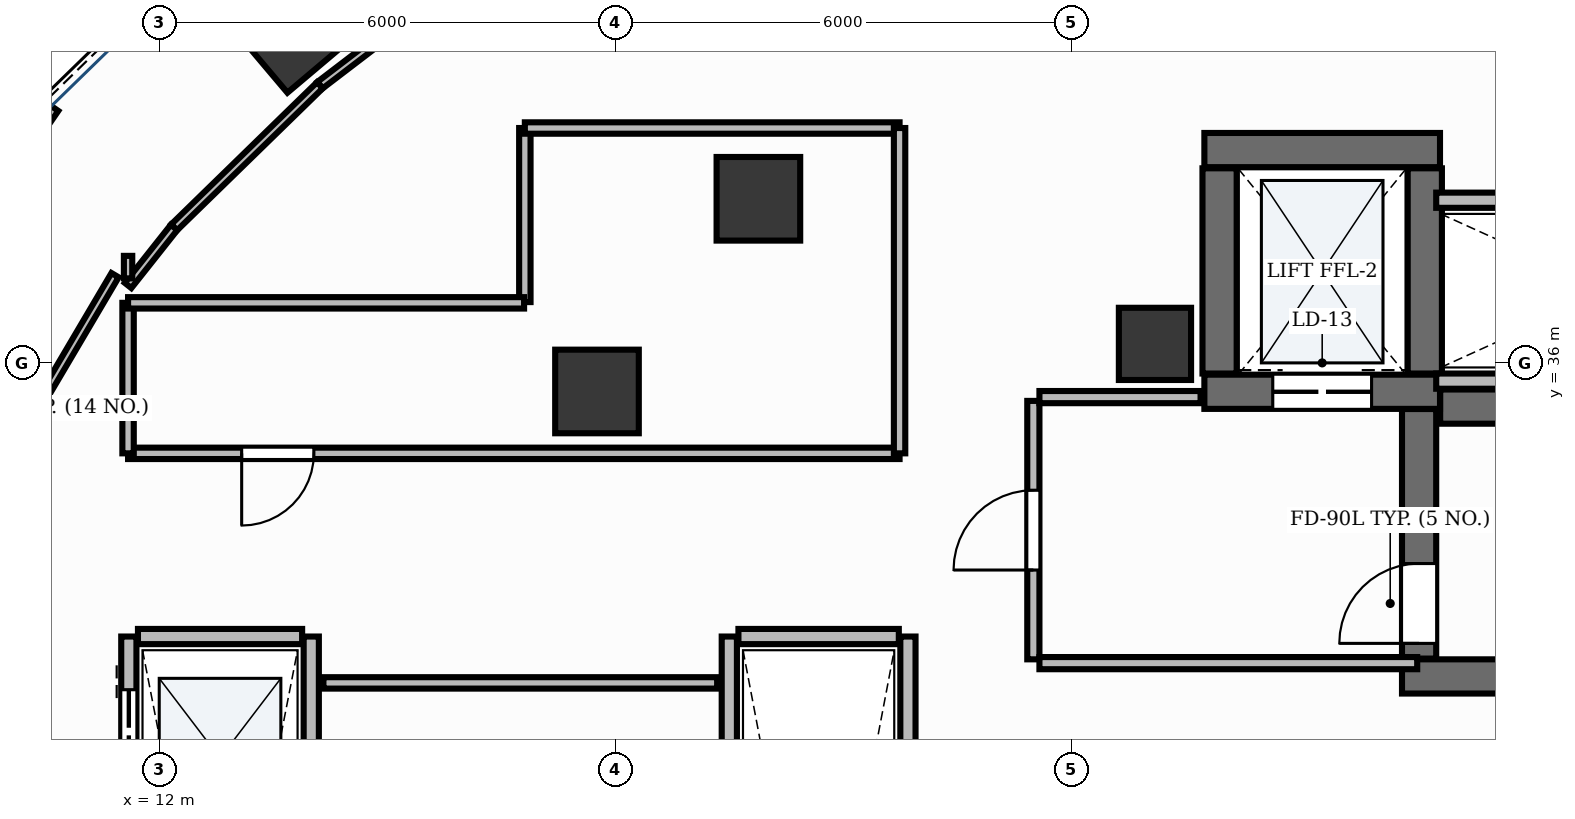
"""IFC4 building model, lengths in metres.
Left out: names, types, materials, properties, quantities, classifications, styles, units other than length and angle.
Written with IfcOpenShell. Run it as: python <this file> out.ifc"""

import sys

from ifc_helpers import new_model, si_unit, direction, frame, frame_2d, origin, origin_2d, place, context, subcontext, project, spatial, rectangle, extrude, element, fill, save


model = new_model("IFC4")
c1 = context("Model", 3, precision=1e-05, world=origin(), true_north=direction((0.0, 1.0)))
c2 = subcontext(c1, "Body", "Model", "MODEL_VIEW")
j1 = project(units=[si_unit("LENGTHUNIT", "METRE"), si_unit("PLANEANGLEUNIT", "RADIAN")], contexts=[c1])
p1 = place(None, origin())
s1 = spatial("IfcSite", under=j1, at=p1, CompositionType="ELEMENT")
p2 = place(p1, origin())
s2 = spatial("IfcBuilding", under=s1, at=p2, CompositionType="ELEMENT")
p3 = place(p2, frame((0.0, 0.0, 106.8)))
s3 = spatial("IfcBuildingStorey", under=s2, at=p3, CompositionType="ELEMENT", Elevation=106.8)
p4 = place(p3, frame((28.852, 35.425, 0.0), z_axis=(0.0, 0.0, 1.0), x_axis=(1.0, 0.0, 0.0)))
e1 = element("IfcWall", 1, at=p4, inside=s3, PredefinedType="SHEAR", context=c2, shape_type="SweptSolid", body=[
    extrude(rectangle(XDim=8.248, YDim=0.45, at=frame_2d((4.124, 0.0))), origin(), (0.0, 0.0, 1.0), 3.9),
])
p5 = place(p3, frame((28.35, 31.875, 0.0), z_axis=(0.0, 0.0, 1.0), x_axis=(1.0, 0.0, 0.0)))
e2 = element("IfcWall", 2, at=p5, inside=s3, PredefinedType="SHEAR", context=c2, shape_type="SweptSolid", body=[
    extrude(rectangle(XDim=8.75, YDim=0.45, at=frame_2d((4.375, 0.0))), origin(), (0.0, 0.0, 1.0), 3.9),
])
p6 = place(p3, frame((28.575, 32.11, 0.0), z_axis=(0.0, 0.0, 1.0), x_axis=(0.0, 1.0, 0.0)))
e3 = element("IfcWall", 3, at=p6, inside=s3, PredefinedType="SHEAR", context=c2, shape_type="SweptSolid", body=[
    extrude(rectangle(XDim=3.283, YDim=0.45, at=frame_2d((1.642, 0.0))), origin(), (0.0, 0.0, 1.0), 3.9),
])
p7 = place(p6, frame((0.2, 0.0, 0.0)))
e4 = element("IfcOpeningElement", 4, at=p7, cuts=e3, PredefinedType="OPENING", context=c2, shape_type="SweptSolid", body=[
    extrude(rectangle(XDim=1.05, YDim=2.15, at=frame_2d((0.525, 1.075))), frame((0.0, 0.24, 0.0), z_axis=(0.0, -1.0, 0.0), x_axis=(1.0, 0.0, 0.0)), (0.0, 0.0, 1.0), 0.48),
])
p8 = place(p3, frame((25.75, 38.8, 0.0), z_axis=(0.0, 0.0, 1.0), x_axis=(1.0, 0.0, 0.0)))
e5 = element("IfcWall", 5, at=p8, inside=s3, PredefinedType="SHEAR", context=c2, shape_type="SweptSolid", body=[
    extrude(rectangle(XDim=3.1, YDim=0.45, at=frame_2d((1.55, 0.0))), origin(), (0.0, 0.0, 1.0), 3.9),
])
p9 = place(p3, frame((25.75, 35.62, 0.0), z_axis=(0.0, 0.0, 1.0), x_axis=(1.0, 0.0, 0.0)))
e6 = element("IfcWall", 6, at=p9, inside=s3, PredefinedType="SHEAR", context=c2, shape_type="SweptSolid", body=[
    extrude(rectangle(XDim=3.1, YDim=0.45, at=frame_2d((1.55, 0.0))), origin(), (0.0, 0.0, 1.0), 3.9),
])
p10 = place(p9, frame((0.9, 0.0, 0.0)))
e7 = element("IfcOpeningElement", 7, at=p10, cuts=e6, PredefinedType="OPENING", context=c2, shape_type="SweptSolid", body=[
    extrude(rectangle(XDim=1.3, YDim=2.2, at=frame_2d((0.65, 1.1))), frame((0.0, 0.24, 0.0), z_axis=(0.0, -1.0, 0.0), x_axis=(1.0, 0.0, 0.0)), (0.0, 0.0, 1.0), 0.48),
])
for number, where, z_axis, x_axis in (
    (8, (25.95, 35.86, 0.0), (0.0, 0.0, 1.0), (0.0, 1.0, 0.0)),
    (9, (28.65, 35.86, 0.0), (0.0, 0.0, 1.0), (0.0, 1.0, 0.0)),
):
    element("IfcWall", number, at=place(p3, frame(where, z_axis=z_axis, x_axis=x_axis)), inside=s3, PredefinedType="SHEAR", context=c2, shape_type="SweptSolid", body=[
        extrude(rectangle(XDim=2.7, YDim=0.45, at=frame_2d((1.35, 0.0))), origin(), (0.0, 0.0, 1.0), 3.9),
    ])
p11 = place(p3, frame((25.1, 36.25, -0.0), z_axis=(0.0, 0.0, 1.0), x_axis=(1.0, 0.0, 0.0)))
e10 = element("IfcColumn", 10, at=p11, inside=s3, PredefinedType="PILASTER", context=c2, shape_type="SweptSolid", body=[
    extrude(rectangle(XDim=0.95, YDim=0.95, at=origin_2d()), origin(), (0.0, 0.0, 1.0), 3.901),
])
p12 = place(p3, frame((13.758, 40.4, -0.0), z_axis=(0.0, 0.0, 1.0), x_axis=(0.764246456939, 0.644924300253, 0.0)))
e11 = element("IfcColumn", 11, at=p12, inside=s3, PredefinedType="COLUMN", context=c2, shape_type="SweptSolid", body=[
    extrude(rectangle(XDim=1.2, YDim=1.2, at=origin_2d()), origin(), (0.0, 0.0, 1.0), 3.901),
])
for number, where, z_axis, x_axis in (
    (12, (19.883, 38.159, -0.0), (0.0, 0.0, 1.0), (1.0, 0.0, 0.0)),
    (13, (17.759, 35.624, -0.0), (0.0, 0.0, 1.0), (1.0, 0.0, 0.0)),
):
    element("IfcColumn", number, at=place(p3, frame(where, z_axis=z_axis, x_axis=x_axis)), inside=s3, PredefinedType="COLUMN", context=c2, shape_type="SweptSolid", body=[
        extrude(rectangle(XDim=1.1, YDim=1.1, at=origin_2d()), origin(), (0.0, 0.0, 1.0), 3.901),
    ])
p13 = place(p3, frame((10.548, 39.4, 0.0), z_axis=(0.0, 0.0, 1.0), x_axis=(-0.566825798999, -0.823837674296, 0.0)))
e14 = element("IfcWall", 14, at=p13, inside=s3, PredefinedType="STANDARD", context=c2, shape_type="SweptSolid", body=[
    extrude(rectangle(XDim=5.826, YDim=0.3, at=frame_2d((2.913, 0.0))), origin(), (0.0, 0.0, 1.0), 3.47),
])
p14 = place(p3, frame((11.6, 21.6, 0.0), z_axis=(0.0, 0.0, 1.0), x_axis=(0.0, 1.0, 0.0)))
e15 = element("IfcWall", 15, at=p14, inside=s3, PredefinedType="PARTITIONING", context=c2, shape_type="SweptSolid", body=[
    extrude(rectangle(XDim=10.8, YDim=0.2, at=frame_2d((5.4, 0.0))), origin(), (0.0, 0.0, 1.0), 2.91),
])
p15 = place(p14, frame((0.9, 0.0, 0.0)))
e16 = element("IfcOpeningElement", 16, at=p15, cuts=e15, PredefinedType="OPENING", context=c2, shape_type="SweptSolid", body=[
    extrude(rectangle(XDim=1.1, YDim=2.2, at=frame_2d((0.55, 1.1))), frame((0.0, 0.115, 0.0), z_axis=(0.0, -1.0, 0.0), x_axis=(1.0, 0.0, 0.0)), (0.0, 0.0, 1.0), 0.23),
])
p16 = place(p14, frame((3.6, 0.0, 0.0)))
e17 = element("IfcOpeningElement", 17, at=p16, cuts=e15, PredefinedType="OPENING", context=c2, shape_type="SweptSolid", body=[
    extrude(rectangle(XDim=1.1, YDim=2.2, at=frame_2d((0.55, 1.1))), frame((0.0, 0.115, 0.0), z_axis=(0.0, -1.0, 0.0), x_axis=(1.0, 0.0, 0.0)), (0.0, 0.0, 1.0), 0.23),
])
p17 = place(p14, frame((6.3, 0.0, 0.0)))
e18 = element("IfcOpeningElement", 18, at=p17, cuts=e15, PredefinedType="OPENING", context=c2, shape_type="SweptSolid", body=[
    extrude(rectangle(XDim=1.1, YDim=2.2, at=frame_2d((0.55, 1.1))), frame((0.0, 0.115, 0.0), z_axis=(0.0, -1.0, 0.0), x_axis=(1.0, 0.0, 0.0)), (0.0, 0.0, 1.0), 0.23),
])
p18 = place(p14, frame((9.0, 0.0, 0.0)))
e19 = element("IfcOpeningElement", 19, at=p18, cuts=e15, PredefinedType="OPENING", context=c2, shape_type="SweptSolid", body=[
    extrude(rectangle(XDim=1.1, YDim=2.2, at=frame_2d((0.55, 1.1))), frame((0.0, 0.115, 0.0), z_axis=(0.0, -1.0, 0.0), x_axis=(1.0, 0.0, 0.0)), (0.0, 0.0, 1.0), 0.23),
])
p19 = place(p3, frame((14.0, 21.6, 0.0), z_axis=(0.0, 0.0, 1.0), x_axis=(0.0, 1.0, 0.0)))
e20 = element("IfcWall", 20, at=p19, inside=s3, PredefinedType="PARTITIONING", context=c2, shape_type="SweptSolid", body=[
    extrude(rectangle(XDim=10.8, YDim=0.2, at=frame_2d((5.4, 0.0))), origin(), (0.0, 0.0, 1.0), 2.91),
])
p20 = place(p3, frame((11.72, 32.4, 0.0), z_axis=(0.0, 0.0, 1.0), x_axis=(1.0, 0.0, 0.0)))
e21 = element("IfcWall", 21, at=p20, inside=s3, PredefinedType="PARTITIONING", context=c2, shape_type="SweptSolid", body=[
    extrude(rectangle(XDim=2.16, YDim=0.2, at=frame_2d((1.08, 0.0))), origin(), (0.0, 0.0, 1.0), 2.91),
])
for number, where, z_axis, x_axis in (
    (22, (19.5, 21.6, 0.0), (0.0, 0.0, 1.0), (0.0, 1.0, 0.0)),
    (23, (21.85, 21.6, 0.0), (0.0, 0.0, 1.0), (0.0, 1.0, 0.0)),
):
    element("IfcWall", number, at=place(p3, frame(where, z_axis=z_axis, x_axis=x_axis)), inside=s3, PredefinedType="PARTITIONING", context=c2, shape_type="SweptSolid", body=[
        extrude(rectangle(XDim=10.8, YDim=0.2, at=frame_2d((5.4, 0.0))), origin(), (0.0, 0.0, 1.0), 2.91),
    ])
p21 = place(p3, frame((19.62, 32.4, 0.0), z_axis=(0.0, 0.0, 1.0), x_axis=(1.0, 0.0, 0.0)))
e24 = element("IfcWall", 24, at=p21, inside=s3, PredefinedType="PARTITIONING", context=c2, shape_type="SweptSolid", body=[
    extrude(rectangle(XDim=2.11, YDim=0.2, at=frame_2d((1.055, 0.0))), origin(), (0.0, 0.0, 1.0), 2.91),
])
for number, where, z_axis, x_axis in (
    (25, (28.8, 35.76, 0.0), (0.0, 0.0, 1.0), (1.0, 0.0, 0.0)),
    (26, (28.8, 38.14, 0.0), (0.0, 0.0, 1.0), (1.0, 0.0, 0.0)),
):
    element("IfcWall", number, at=place(p3, frame(where, z_axis=z_axis, x_axis=x_axis)), inside=s3, PredefinedType="PARTITIONING", context=c2, shape_type="SweptSolid", body=[
        extrude(rectangle(XDim=4.57, YDim=0.2, at=frame_2d((2.285, 0.0))), origin(), (0.0, 0.0, 1.0), 2.91),
    ])
p22 = place(p3, frame((23.5, 32.1, 0.0), z_axis=(0.0, 0.0, 1.0), x_axis=(0.0, 1.0, 0.0)))
e27 = element("IfcWall", 27, at=p22, inside=s3, PredefinedType="PARTITIONING", context=c2, shape_type="SweptSolid", body=[
    extrude(rectangle(XDim=3.4, YDim=0.16, at=frame_2d((1.7, 0.0))), origin(), (0.0, 0.0, 1.0), 2.91),
])
p23 = place(p22, frame((1.175, 0.0, 0.0)))
e28 = element("IfcOpeningElement", 28, at=p23, cuts=e27, PredefinedType="OPENING", context=c2, shape_type="SweptSolid", body=[
    extrude(rectangle(XDim=1.05, YDim=2.15, at=frame_2d((0.525, 1.075))), frame((0.0, 0.095, 0.0), z_axis=(0.0, -1.0, 0.0), x_axis=(1.0, 0.0, 0.0)), (0.0, 0.0, 1.0), 0.19),
])
p24 = place(p3, frame((23.58, 32.05, 0.0), z_axis=(0.0, 0.0, 1.0), x_axis=(1.0, 0.0, 0.0)))
e29 = element("IfcWall", 29, at=p24, inside=s3, PredefinedType="PARTITIONING", context=c2, shape_type="SweptSolid", body=[
    extrude(rectangle(XDim=4.97, YDim=0.16, at=frame_2d((2.485, 0.0))), origin(), (0.0, 0.0, 1.0), 2.91),
])
p25 = place(p3, frame((23.58, 35.55, 0.0), z_axis=(0.0, 0.0, 1.0), x_axis=(1.0, 0.0, 0.0)))
e30 = element("IfcWall", 30, at=p25, inside=s3, PredefinedType="PARTITIONING", context=c2, shape_type="SweptSolid", body=[
    extrude(rectangle(XDim=2.12, YDim=0.16, at=frame_2d((1.06, 0.0))), origin(), (0.0, 0.0, 1.0), 2.91),
])
p26 = place(p3, frame((21.74, 34.81, 0.0), z_axis=(0.0, 0.0, 1.0), x_axis=(-1.0, 0.0, 0.0)))
e31 = element("IfcWall", 31, at=p26, inside=s3, PredefinedType="PARTITIONING", context=c2, shape_type="SweptSolid", body=[
    extrude(rectangle(XDim=10.15, YDim=0.15, at=frame_2d((5.075, 0.0))), origin(), (0.0, 0.0, 1.0), 2.91),
])
p27 = place(p26, frame((7.705, 0.0, 0.0)))
e32 = element("IfcOpeningElement", 32, at=p27, cuts=e31, PredefinedType="OPENING", context=c2, shape_type="SweptSolid", body=[
    extrude(rectangle(XDim=0.95, YDim=2.15, at=frame_2d((0.475, 1.075))), frame((0.0, 0.09, 0.0), z_axis=(0.0, -1.0, 0.0), x_axis=(1.0, 0.0, 0.0)), (0.0, 0.0, 1.0), 0.18),
])
p28 = place(p3, frame((16.81, 36.8, 0.0), z_axis=(0.0, 0.0, 1.0), x_axis=(0.0, 1.0, 0.0)))
e33 = element("IfcWall", 33, at=p28, inside=s3, PredefinedType="PARTITIONING", context=c2, shape_type="SweptSolid", body=[
    extrude(rectangle(XDim=2.29, YDim=0.15, at=frame_2d((1.145, 0.0))), origin(), (0.0, 0.0, 1.0), 2.91),
])
p29 = place(p3, frame((16.81, 39.09, 0.0), z_axis=(0.0, 0.0, 1.0), x_axis=(1.0, 0.0, 0.0)))
e34 = element("IfcWall", 34, at=p29, inside=s3, PredefinedType="PARTITIONING", context=c2, shape_type="SweptSolid", body=[
    extrude(rectangle(XDim=4.93, YDim=0.15, at=frame_2d((2.465, 0.0))), origin(), (0.0, 0.0, 1.0), 2.91),
])
p30 = place(p3, frame((21.74, 39.09, 0.0), z_axis=(0.0, 0.0, 1.0), x_axis=(0.0, -1.0, 0.0)))
e35 = element("IfcWall", 35, at=p30, inside=s3, PredefinedType="PARTITIONING", context=c2, shape_type="SweptSolid", body=[
    extrude(rectangle(XDim=4.28, YDim=0.15, at=frame_2d((2.14, 0.0))), origin(), (0.0, 0.0, 1.0), 2.91),
])
p31 = place(p3, frame((11.59, 34.81, 0.0), z_axis=(0.0, 0.0, 1.0), x_axis=(0.0, 1.0, 0.0)))
e36 = element("IfcWall", 36, at=p31, inside=s3, PredefinedType="PARTITIONING", context=c2, shape_type="SweptSolid", body=[
    extrude(rectangle(XDim=1.98, YDim=0.15, at=frame_2d((0.99, 0.0))), origin(), (0.0, 0.0, 1.0), 2.91),
])
p32 = place(p3, frame((11.59, 36.79, 0.0), z_axis=(0.0, 0.0, 1.0), x_axis=(1.0, 0.0, 0.0)))
e37 = element("IfcWall", 37, at=p32, inside=s3, PredefinedType="PARTITIONING", context=c2, shape_type="SweptSolid", body=[
    extrude(rectangle(XDim=5.21, YDim=0.15, at=frame_2d((2.605, 0.0))), origin(), (0.0, 0.0, 1.0), 2.91),
])
p33 = place(p3, frame((16.339, 41.354, 0.0), z_axis=(0.0, 0.0, 1.0), x_axis=(-0.794513779695, -0.607246122981, 0.0)))
e38 = element("IfcWall", 38, at=p33, inside=s3, PredefinedType="MOVABLE", context=c2, shape_type="SweptSolid", body=[
    extrude(rectangle(XDim=2.799, YDim=0.11, at=frame_2d((1.399, 0.0))), origin(), (0.0, 0.0, 1.0), 2.91),
])
p34 = place(p3, frame((14.114, 39.653, 0.0), z_axis=(0.0, 0.0, 1.0), x_axis=(-0.716161838398, -0.697934252794, 0.0)))
e39 = element("IfcWall", 39, at=p34, inside=s3, PredefinedType="MOVABLE", context=c2, shape_type="SweptSolid", body=[
    extrude(rectangle(XDim=2.679, YDim=0.11, at=frame_2d((1.339, 0.0))), origin(), (0.0, 0.0, 1.0), 2.91),
])
p35 = place(p3, frame((12.195, 37.782, 0.0), z_axis=(0.0, 0.0, 1.0), x_axis=(-0.621081637991, -0.783745876513, 0.0)))
e40 = element("IfcWall", 40, at=p35, inside=s3, PredefinedType="MOVABLE", context=c2, shape_type="SweptSolid", body=[
    extrude(rectangle(XDim=0.974, YDim=0.11, at=frame_2d((0.487, 0.0))), origin(), (0.0, 0.0, 1.0), 2.91),
])
p36 = place(p3, frame((11.59, 37.112, 0.0), z_axis=(0.0, 0.0, 1.0), x_axis=(0.0, 1.0, 0.0)))
e41 = element("IfcWall", 41, at=p36, inside=s3, PredefinedType="MOVABLE", context=c2, shape_type="SweptSolid", body=[
    extrude(rectangle(XDim=0.296, YDim=0.11, at=frame_2d((0.148, 0.0))), origin(), (0.0, 0.0, 1.0), 2.91),
])
p37 = place(p3, frame((11.419, 37.154, 0.0), z_axis=(0.0, 0.0, 1.0), x_axis=(-0.508183269016, -0.861248956511, 0.0)))
e42 = element("IfcWall", 42, at=p37, inside=s3, PredefinedType="MOVABLE", context=c2, shape_type="SweptSolid", body=[
    extrude(rectangle(XDim=4.053, YDim=0.11, at=frame_2d((2.026, 0.0))), origin(), (0.0, 0.0, 1.0), 2.91),
])
p38 = place(p3, frame((14.16, 31.79, 0.0), z_axis=(0.0, 0.0, 1.0), x_axis=(1.0, 0.0, 0.0)))
e43 = element("IfcWall", 43, at=p38, inside=s3, PredefinedType="PARTITIONING", context=c2, shape_type="SweptSolid", body=[
    extrude(rectangle(XDim=5.18, YDim=0.15, at=frame_2d((2.59, 0.0))), origin(), (0.0, 0.0, 1.0), 2.91),
])
p39 = place(p7, origin())
e44 = element("IfcDoor", 44, at=p39, inside=s3, OperationType="SINGLE_SWING_LEFT", PredefinedType="DOOR", context=c2, shape_type="SweptSolid", body=[
    extrude(rectangle(XDim=1.05, YDim=2.15, at=frame_2d((0.525, 1.075))), frame((0.0, 0.025, 0.0), z_axis=(0.0, -1.0, 0.0), x_axis=(1.0, 0.0, 0.0)), (0.0, 0.0, 1.0), 0.05),
])
fill(e4, e44)
p40 = place(p18, origin())
e45 = element("IfcDoor", 45, at=p40, inside=s3, OperationType="DOUBLE_DOOR_SLIDING", PredefinedType="DOOR", context=c2, shape_type="SweptSolid", body=[
    extrude(rectangle(XDim=1.1, YDim=2.2, at=frame_2d((0.55, 1.1))), frame((0.0, 0.025, 0.0), z_axis=(0.0, -1.0, 0.0), x_axis=(1.0, 0.0, 0.0)), (0.0, 0.0, 1.0), 0.05),
])
fill(e19, e45)
p41 = place(p10, origin())
e46 = element("IfcDoor", 46, at=p41, inside=s3, OperationType="DOUBLE_DOOR_SLIDING", PredefinedType="DOOR", context=c2, shape_type="SweptSolid", body=[
    extrude(rectangle(XDim=1.3, YDim=2.2, at=frame_2d((0.65, 1.1))), frame((0.0, 0.025, 0.0), z_axis=(0.0, -1.0, 0.0), x_axis=(1.0, 0.0, 0.0)), (0.0, 0.0, 1.0), 0.05),
])
fill(e7, e46)
p42 = place(p23, origin())
e47 = element("IfcDoor", 47, at=p42, inside=s3, OperationType="SINGLE_SWING_LEFT", PredefinedType="DOOR", context=c2, shape_type="SweptSolid", body=[
    extrude(rectangle(XDim=1.05, YDim=2.15, at=frame_2d((0.525, 1.075))), frame((0.0, 0.025, 0.0), z_axis=(0.0, -1.0, 0.0), x_axis=(1.0, 0.0, 0.0)), (0.0, 0.0, 1.0), 0.05),
])
fill(e28, e47)
p43 = place(p27, origin())
e48 = element("IfcDoor", 48, at=p43, inside=s3, OperationType="SINGLE_SWING_RIGHT", PredefinedType="DOOR", context=c2, shape_type="SweptSolid", body=[
    extrude(rectangle(XDim=0.95, YDim=2.15, at=frame_2d((0.475, 1.075))), frame((0.0, 0.025, 0.0), z_axis=(0.0, -1.0, 0.0), x_axis=(1.0, 0.0, 0.0)), (0.0, 0.0, 1.0), 0.05),
])
fill(e32, e48)
save(model, sys.argv[1])
